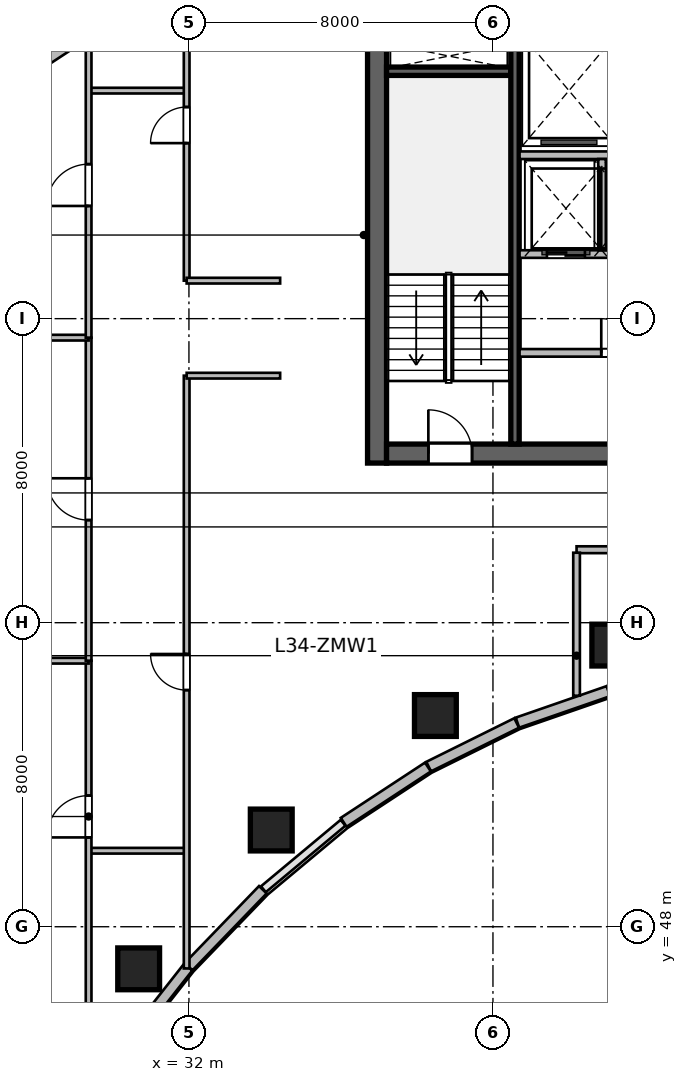
"""IFC4 building model, lengths in metres.
Left out: names, types, materials, properties, quantities, classifications, styles, units other than length and angle.
Written with IfcOpenShell. Run it as: python <this file> out.ifc"""

import sys

from ifc_helpers import new_model, si_unit, direction, frame, frame_2d, origin, origin_2d, place, context, subcontext, project, spatial, rectangle, circle, extrude, source, transform, mapped, element, fill, save


model = new_model("IFC4")
c1 = context("Model", 3, precision=1e-05, world=origin(), true_north=direction((0.0, 1.0)))
c2 = subcontext(c1, "Body", "Model", "MODEL_VIEW")
j1 = project(units=[si_unit("LENGTHUNIT", "METRE"), si_unit("PLANEANGLEUNIT", "RADIAN")], contexts=[c1])
p1 = place(None, origin())
s1 = spatial("IfcSite", under=j1, at=p1, CompositionType="ELEMENT")
p2 = place(p1, origin())
s2 = spatial("IfcBuilding", under=s1, at=p2, CompositionType="ELEMENT")
p3 = place(p2, frame((0.0, 0.0, 142.8)))
s3 = spatial("IfcBuildingStorey", under=s2, at=p3, CompositionType="ELEMENT", Elevation=142.8)
m1 = source(origin(), c2, "Body", "SweptSolid", [
    extrude(rectangle(XDim=12.0, YDim=0.5, at=frame_2d((6.0, 0.0))), origin(), (0.0, 0.0, 1.0), 3.9),
])
p4 = place(p3, frame((36.95, 60.2, 0.0), z_axis=(0.0, 0.0, 1.0), x_axis=(0.0, 1.0, 0.0)))
e1 = element("IfcWall", 1, at=p4, inside=s3, PredefinedType="SHEAR", context=c2, shape_type="MappedRepresentation", body=[
    mapped(m1, transform((0.0, 0.0, 0.0), scale=1.0)),
])
m2 = source(origin(), c2, "Body", "SweptSolid", [
    extrude(rectangle(XDim=21.6, YDim=0.5, at=frame_2d((10.8, 0.0))), origin(), (0.0, 0.0, 1.0), 3.9),
])
p5 = place(p3, frame((37.2, 60.45, 0.0), z_axis=(0.0, 0.0, 1.0), x_axis=(1.0, 0.0, 0.0)))
e2 = element("IfcWall", 2, at=p5, inside=s3, PredefinedType="SHEAR", context=c2, shape_type="MappedRepresentation", body=[
    mapped(m2, transform((0.0, 0.0, 0.0), scale=1.0)),
])
p6 = place(p5, frame((1.1, 0.0, 0.0)))
e3 = element("IfcOpeningElement", 3, at=p6, cuts=e2, PredefinedType="OPENING", context=c2, shape_type="SweptSolid", body=[
    extrude(rectangle(XDim=1.15, YDim=2.15, at=frame_2d((0.575, 1.075))), frame((0.0, 0.26, 0.0), z_axis=(0.0, -1.0, 0.0), x_axis=(1.0, 0.0, 0.0)), (0.0, 0.0, 1.0), 0.52),
])
p7 = place(p5, frame((19.5, 0.0, 0.0)))
e4 = element("IfcOpeningElement", 4, at=p7, cuts=e2, PredefinedType="OPENING", context=c2, shape_type="SweptSolid", body=[
    extrude(rectangle(XDim=0.9, YDim=2.1, at=frame_2d((0.45, 1.05))), frame((0.0, 0.26, 0.0), z_axis=(0.0, -1.0, 0.0), x_axis=(1.0, 0.0, 0.0)), (0.0, 0.0, 1.0), 0.52),
])
p8 = place(p5, frame((12.02, 0.0, 0.0)))
e5 = element("IfcOpeningElement", 5, at=p8, cuts=e2, PredefinedType="OPENING", context=c2, shape_type="SweptSolid", body=[
    extrude(rectangle(XDim=1.6, YDim=2.15, at=frame_2d((0.8, 1.075))), frame((0.0, 0.26, 0.0), z_axis=(0.0, -1.0, 0.0), x_axis=(1.0, 0.0, 0.0)), (0.0, 0.0, 1.0), 0.52),
])
m3 = source(origin(), c2, "Body", "SweptSolid", [
    extrude(rectangle(XDim=3.27, YDim=0.22, at=frame_2d((1.635, 0.0))), origin(), (0.0, 0.0, 1.0), 3.9),
])
p9 = place(p3, frame((37.2, 70.51, 0.0), z_axis=(0.0, 0.0, 1.0), x_axis=(1.0, 0.0, 0.0)))
e6 = element("IfcWall", 6, at=p9, inside=s3, PredefinedType="SHEAR", context=c2, shape_type="MappedRepresentation", body=[
    mapped(m3, transform((0.0, 0.0, 0.0), scale=1.0)),
])
m4 = source(origin(), c2, "Body", "SweptSolid", [
    extrude(rectangle(XDim=11.0, YDim=0.22, at=frame_2d((5.5, 0.0))), origin(), (0.0, 0.0, 1.0), 3.9),
])
p10 = place(p3, frame((40.58, 60.7, 0.0), z_axis=(0.0, 0.0, 1.0), x_axis=(0.0, 1.0, 0.0)))
e7 = element("IfcWall", 7, at=p10, inside=s3, PredefinedType="SHEAR", context=c2, shape_type="MappedRepresentation", body=[
    mapped(m4, transform((0.0, 0.0, 0.0), scale=1.0)),
])
m5 = source(origin(), c2, "Body", "SweptSolid", [
    extrude(circle(Radius=0.55, at=origin_2d()), origin(), (0.0, 0.0, 1.0), 3.9),
])
for number, where, z_axis, x_axis in (
    (8, (30.677, 46.892, 0.0), (0.0, 0.0, 1.0), (-0.571, 0.821, 0.0)),
    (9, (34.166, 50.545, 0.0), (0.0, 0.0, 1.0), (-0.436, 0.9, 0.0)),
    (10, (38.485, 53.558, 0.0), (0.0, 0.0, 1.0), (-0.289, 0.957, 0.0)),
    (11, (43.154, 55.411, 0.0), (0.0, 0.0, 1.0), (-0.143, 0.99, 0.0)),
):
    element("IfcColumn", number, at=place(p3, frame(where, z_axis=z_axis, x_axis=x_axis)), inside=s3, PredefinedType="COLUMN", context=c2, shape_type="MappedRepresentation", body=[
        mapped(m5, transform((0.0, 0.0, 0.0), scale=1.0)),
    ])
m6 = source(origin(), c2, "Body", "SweptSolid", [
    extrude(rectangle(XDim=2.53, YDim=0.28, at=frame_2d((1.265, 0.0))), origin(), (0.0, 0.0, 1.0), 3.65),
])
p11 = place(p3, frame((43.035, 54.198, 0.0), z_axis=(0.0, 0.0, 1.0), x_axis=(-0.944872429646, -0.327438683872, 0.0)))
e12 = element("IfcWall", 12, at=p11, inside=s3, PredefinedType="SOLIDWALL", context=c2, shape_type="MappedRepresentation", body=[
    mapped(m6, transform((0.0, 0.0, 0.0), scale=1.0)),
])
m7 = source(origin(), c2, "Body", "SweptSolid", [
    extrude(rectangle(XDim=2.584, YDim=0.28, at=frame_2d((1.292, 0.0))), origin(), (0.0, 0.0, 1.0), 3.65),
])
p12 = place(p3, frame((40.624, 53.361, 0.0), z_axis=(0.0, 0.0, 1.0), x_axis=(-0.895989792847, -0.44407464588, 0.0)))
e13 = element("IfcWall", 13, at=p12, inside=s3, PredefinedType="SOLIDWALL", context=c2, shape_type="MappedRepresentation", body=[
    mapped(m7, transform((0.0, 0.0, 0.0), scale=1.0)),
])
m8 = source(origin(), c2, "Body", "SweptSolid", [
    extrude(rectangle(XDim=2.652, YDim=0.28, at=frame_2d((1.326, 0.0))), origin(), (0.0, 0.0, 1.0), 3.65),
])
p13 = place(p3, frame((38.289, 52.202, 0.0), z_axis=(0.0, 0.0, 1.0), x_axis=(-0.836008323535, -0.54871676025, 0.0)))
e14 = element("IfcWall", 14, at=p13, inside=s3, PredefinedType="SOLIDWALL", context=c2, shape_type="MappedRepresentation", body=[
    mapped(m8, transform((0.0, 0.0, 0.0), scale=1.0)),
])
m9 = source(origin(), c2, "Body", "SweptSolid", [
    extrude(rectangle(XDim=2.812, YDim=0.28, at=frame_2d((1.406, 0.0))), origin(), (0.0, 0.0, 1.0), 3.65),
])
p14 = place(p3, frame((33.945, 48.973, 0.0), z_axis=(0.0, 0.0, 1.0), x_axis=(-0.694583668785, -0.719411931411, 0.0)))
e15 = element("IfcWall", 15, at=p14, inside=s3, PredefinedType="SOLIDWALL", context=c2, shape_type="MappedRepresentation", body=[
    mapped(m9, transform((0.0, 0.0, 0.0), scale=1.0)),
])
m10 = source(origin(), c2, "Body", "SweptSolid", [
    extrude(rectangle(XDim=2.897, YDim=0.28, at=frame_2d((1.448, 0.0))), origin(), (0.0, 0.0, 1.0), 3.65),
])
p15 = place(p3, frame((31.979, 46.936, 0.0), z_axis=(0.0, 0.0, 1.0), x_axis=(-0.618167636915, -0.786046291685, 0.0)))
e16 = element("IfcWall", 16, at=p15, inside=s3, PredefinedType="SOLIDWALL", context=c2, shape_type="MappedRepresentation", body=[
    mapped(m10, transform((0.0, 0.0, 0.0), scale=1.0)),
])
m11 = source(origin(), c2, "Body", "SweptSolid", [
    extrude(rectangle(XDim=4.501, YDim=0.28, at=frame_2d((2.25, 0.0))), origin(), (0.0, 0.0, 1.0), 3.65),
])
p16 = place(p3, frame((27.939, 70.61, 0.0), z_axis=(0.0, 0.0, 1.0), x_axis=(0.835984920737, 0.548752414391, 0.0)))
e17 = element("IfcWall", 17, at=p16, inside=s3, PredefinedType="SOLIDWALL", context=c2, shape_type="MappedRepresentation", body=[
    mapped(m11, transform((0.0, 0.0, 0.0), scale=1.0)),
])
m12 = source(origin(), c2, "Body", "SweptSolid", [
    extrude(rectangle(XDim=8.8, YDim=0.2, at=frame_2d((4.4, 0.0))), origin(), (0.0, 0.0, 1.0), 3.65),
])
p17 = place(p3, frame((40.7, 68.3, 0.0), z_axis=(0.0, 0.0, 1.0), x_axis=(1.0, 0.0, 0.0)))
e18 = element("IfcWall", 18, at=p17, inside=s3, PredefinedType="SOLIDWALL", context=c2, shape_type="MappedRepresentation", body=[
    mapped(m12, transform((0.0, 0.0, 0.0), scale=1.0)),
])
m13 = source(origin(), c2, "Body", "SweptSolid", [
    extrude(rectangle(XDim=8.02, YDim=0.2, at=frame_2d((4.01, 0.0))), origin(), (0.0, 0.0, 1.0), 3.65),
])
p18 = place(p3, frame((40.7, 63.1, 0.0), z_axis=(0.0, 0.0, 1.0), x_axis=(1.0, 0.0, 0.0)))
e19 = element("IfcWall", 19, at=p18, inside=s3, PredefinedType="SOLIDWALL", context=c2, shape_type="MappedRepresentation", body=[
    mapped(m13, transform((0.0, 0.0, 0.0), scale=1.0)),
])
p19 = place(p18, frame((2.15, 0.0, 0.0)))
e20 = element("IfcOpeningElement", 20, at=p19, cuts=e19, PredefinedType="OPENING", context=c2, shape_type="SweptSolid", body=[
    extrude(rectangle(XDim=0.9, YDim=2.1, at=frame_2d((0.45, 1.05))), frame((0.0, 0.11, 0.0), z_axis=(0.0, -1.0, 0.0), x_axis=(1.0, 0.0, 0.0)), (0.0, 0.0, 1.0), 0.22),
])
p20 = place(p18, frame((6.09, 0.0, 0.0)))
e21 = element("IfcOpeningElement", 21, at=p20, cuts=e19, PredefinedType="OPENING", context=c2, shape_type="SweptSolid", body=[
    extrude(rectangle(XDim=0.9, YDim=2.1, at=frame_2d((0.45, 1.05))), frame((0.0, 0.11, 0.0), z_axis=(0.0, -1.0, 0.0), x_axis=(1.0, 0.0, 0.0)), (0.0, 0.0, 1.0), 0.22),
])
p21 = place(p3, frame((40.7, 65.7, 0.0), z_axis=(0.0, 0.0, 1.0), x_axis=(1.0, 0.0, 0.0)))
e22 = element("IfcWall", 22, at=p21, inside=s3, PredefinedType="SOLIDWALL", context=c2, shape_type="MappedRepresentation", body=[
    mapped(m12, transform((0.0, 0.0, 0.0), scale=1.0)),
])
p22 = place(p21, frame((0.72, 0.0, 0.0)))
e23 = element("IfcOpeningElement", 23, at=p22, cuts=e22, PredefinedType="OPENING", context=c2, shape_type="SweptSolid", body=[
    extrude(rectangle(XDim=1.0, YDim=2.15, at=frame_2d((0.5, 1.075))), frame((0.0, 0.11, 0.0), z_axis=(0.0, -1.0, 0.0), x_axis=(1.0, 0.0, 0.0)), (0.0, 0.0, 1.0), 0.22),
])
p23 = place(p21, frame((2.62, 0.0, 0.0)))
e24 = element("IfcOpeningElement", 24, at=p23, cuts=e22, PredefinedType="OPENING", context=c2, shape_type="SweptSolid", body=[
    extrude(rectangle(XDim=1.0, YDim=2.15, at=frame_2d((0.5, 1.075))), frame((0.0, 0.11, 0.0), z_axis=(0.0, -1.0, 0.0), x_axis=(1.0, 0.0, 0.0)), (0.0, 0.0, 1.0), 0.22),
])
p24 = place(p21, frame((4.55, 0.0, 0.0)))
e25 = element("IfcOpeningElement", 25, at=p24, cuts=e22, PredefinedType="OPENING", context=c2, shape_type="SweptSolid", body=[
    extrude(rectangle(XDim=1.0, YDim=2.15, at=frame_2d((0.5, 1.075))), frame((0.0, 0.11, 0.0), z_axis=(0.0, -1.0, 0.0), x_axis=(1.0, 0.0, 0.0)), (0.0, 0.0, 1.0), 0.22),
])
p25 = place(p21, frame((6.55, 0.0, 0.0)))
e26 = element("IfcOpeningElement", 26, at=p25, cuts=e22, PredefinedType="OPENING", context=c2, shape_type="SweptSolid", body=[
    extrude(rectangle(XDim=1.0, YDim=2.15, at=frame_2d((0.5, 1.075))), frame((0.0, 0.11, 0.0), z_axis=(0.0, -1.0, 0.0), x_axis=(1.0, 0.0, 0.0)), (0.0, 0.0, 1.0), 0.22),
])
m14 = source(origin(), c2, "Body", "SweptSolid", [
    extrude(rectangle(XDim=2.4, YDim=0.2, at=frame_2d((1.2, 0.0))), origin(), (0.0, 0.0, 1.0), 3.65),
])
p26 = place(p3, frame((42.87, 65.8, 0.0), z_axis=(0.0, 0.0, 1.0), x_axis=(0.0, 1.0, 0.0)))
e27 = element("IfcWall", 27, at=p26, inside=s3, PredefinedType="SOLIDWALL", context=c2, shape_type="MappedRepresentation", body=[
    mapped(m14, transform((0.0, 0.0, 0.0), scale=1.0)),
])
m15 = source(origin(), c2, "Body", "SweptSolid", [
    extrude(rectangle(XDim=4.176, YDim=0.18, at=frame_2d((2.088, 0.0))), origin(), (0.0, 0.0, 1.0), 3.65),
])
p27 = place(p3, frame((42.2, 57.92, 0.0), z_axis=(0.0, 0.0, 1.0), x_axis=(1.0, 0.0, 0.0)))
e28 = element("IfcWall", 28, at=p27, inside=s3, PredefinedType="PLUMBINGWALL", context=c2, shape_type="MappedRepresentation", body=[
    mapped(m15, transform((0.0, 0.0, 0.0), scale=1.0)),
])
p28 = place(p27, frame((1.638, 0.0, 0.0)))
e29 = element("IfcOpeningElement", 29, at=p28, cuts=e28, PredefinedType="OPENING", context=c2, shape_type="SweptSolid", body=[
    extrude(rectangle(XDim=0.9, YDim=2.08, at=frame_2d((0.45, 1.04))), frame((0.0, 0.1, 0.0), z_axis=(0.0, -1.0, 0.0), x_axis=(1.0, 0.0, 0.0)), (0.0, 0.0, 1.0), 0.2),
])
m16 = source(origin(), c2, "Body", "SweptSolid", [
    extrude(rectangle(XDim=3.763, YDim=0.175, at=frame_2d((1.881, 0.0))), origin(), (0.0, 0.0, 1.0), 3.65),
])
p29 = place(p3, frame((42.2, 54.079, 0.0), z_axis=(0.0, 0.0, 1.0), x_axis=(0.0, 1.0, 0.0)))
e30 = element("IfcWall", 30, at=p29, inside=s3, PredefinedType="PARTITIONING", context=c2, shape_type="MappedRepresentation", body=[
    mapped(m16, transform((0.0, 0.0, 0.0), scale=1.0)),
])
m17 = source(origin(), c2, "Body", "SweptSolid", [
    extrude(rectangle(XDim=2.5, YDim=0.15, at=frame_2d((1.25, 0.0))), origin(), (0.0, 0.0, 1.0), 3.65),
])
for number, where, z_axis, x_axis in (
    (31, (29.4, 50.0, 0.0), (0.0, 0.0, 1.0), (1.0, 0.0, 0.0)),
    (32, (29.4, 70.0, 0.0), (0.0, 0.0, 1.0), (1.0, 0.0, 0.0)),
):
    element("IfcWall", number, at=place(p3, frame(where, z_axis=z_axis, x_axis=x_axis)), inside=s3, PredefinedType="PARTITIONING", context=c2, shape_type="MappedRepresentation", body=[
        mapped(m17, transform((0.0, 0.0, 0.0), scale=1.0)),
    ])
m18 = source(origin(), c2, "Body", "SweptSolid", [
    extrude(rectangle(XDim=11.612, YDim=0.15, at=frame_2d((5.806, 0.0))), origin(), (0.0, 0.0, 1.0), 2.942),
])
p30 = place(p3, frame((29.36, 43.388, 0.0), z_axis=(0.0, 0.0, 1.0), x_axis=(0.0, 1.0, 0.0)))
e33 = element("IfcWall", 33, at=p30, inside=s3, PredefinedType="PARTITIONING", context=c2, shape_type="MappedRepresentation", body=[
    mapped(m18, transform((0.0, 0.0, 0.0), scale=1.0)),
])
p31 = place(p30, frame((6.962, 0.0, 0.0)))
e34 = element("IfcOpeningElement", 34, at=p31, cuts=e33, PredefinedType="OPENING", context=c2, shape_type="SweptSolid", body=[
    extrude(rectangle(XDim=1.1, YDim=2.15, at=frame_2d((0.55, 1.075))), frame((0.0, 0.085, 0.0), z_axis=(0.0, -1.0, 0.0), x_axis=(1.0, 0.0, 0.0)), (0.0, 0.0, 1.0), 0.17),
])
m19 = source(origin(), c2, "Body", "SweptSolid", [
    extrude(rectangle(XDim=14.623, YDim=0.15, at=frame_2d((7.312, 0.0))), origin(), (0.0, 0.0, 1.0), 3.65),
])
p32 = place(p3, frame((14.737, 55.0, 0.0), z_axis=(0.0, 0.0, 1.0), x_axis=(1.0, 0.0, 0.0)))
e35 = element("IfcWall", 35, at=p32, inside=s3, PredefinedType="PARTITIONING", context=c2, shape_type="MappedRepresentation", body=[
    mapped(m19, transform((0.0, 0.0, 0.0), scale=1.0)),
])
m20 = source(origin(), c2, "Body", "SweptSolid", [
    extrude(rectangle(XDim=8.5, YDim=0.15, at=frame_2d((4.25, 0.0))), origin(), (0.0, 0.0, 1.0), 2.942),
])
p33 = place(p3, frame((29.36, 55.0, 0.0), z_axis=(0.0, 0.0, 1.0), x_axis=(0.0, 1.0, 0.0)))
e36 = element("IfcWall", 36, at=p33, inside=s3, PredefinedType="PARTITIONING", context=c2, shape_type="MappedRepresentation", body=[
    mapped(m20, transform((0.0, 0.0, 0.0), scale=1.0)),
])
p34 = place(p33, frame((3.7, 0.0, 0.0)))
e37 = element("IfcOpeningElement", 37, at=p34, cuts=e36, PredefinedType="OPENING", context=c2, shape_type="SweptSolid", body=[
    extrude(rectangle(XDim=1.1, YDim=2.15, at=frame_2d((0.55, 1.075))), frame((0.0, 0.085, 0.0), z_axis=(0.0, -1.0, 0.0), x_axis=(1.0, 0.0, 0.0)), (0.0, 0.0, 1.0), 0.17),
])
m21 = source(origin(), c2, "Body", "SweptSolid", [
    extrude(rectangle(XDim=8.839, YDim=0.15, at=frame_2d((4.419, 0.0))), origin(), (0.0, 0.0, 1.0), 3.65),
])
p35 = place(p3, frame((20.521, 63.5, 0.0), z_axis=(0.0, 0.0, 1.0), x_axis=(1.0, 0.0, 0.0)))
e38 = element("IfcWall", 38, at=p35, inside=s3, PredefinedType="PARTITIONING", context=c2, shape_type="MappedRepresentation", body=[
    mapped(m21, transform((0.0, 0.0, 0.0), scale=1.0)),
])
m22 = source(origin(), c2, "Body", "SweptSolid", [
    extrude(rectangle(XDim=8.031, YDim=0.15, at=frame_2d((4.015, 0.0))), origin(), (0.0, 0.0, 1.0), 3.65),
])
p36 = place(p3, frame((29.36, 63.5, 0.0), z_axis=(0.0, 0.0, 1.0), x_axis=(0.0, 1.0, 0.0)))
e39 = element("IfcWall", 39, at=p36, inside=s3, PredefinedType="PARTITIONING", context=c2, shape_type="MappedRepresentation", body=[
    mapped(m22, transform((0.0, 0.0, 0.0), scale=1.0)),
])
p37 = place(p36, frame((3.465, 0.0, 0.0)))
e40 = element("IfcOpeningElement", 40, at=p37, cuts=e39, PredefinedType="OPENING", context=c2, shape_type="SweptSolid", body=[
    extrude(rectangle(XDim=1.1, YDim=2.15, at=frame_2d((0.55, 1.075))), frame((0.0, 0.085, 0.0), z_axis=(0.0, -1.0, 0.0), x_axis=(1.0, 0.0, 0.0)), (0.0, 0.0, 1.0), 0.17),
])
m23 = source(origin(), c2, "Body", "SweptSolid", [
    extrude(rectangle(XDim=15.598, YDim=0.15, at=frame_2d((7.799, 0.0))), origin(), (0.0, 0.0, 1.0), 2.942),
])
p38 = place(p3, frame((31.94, 46.902, 0.0), z_axis=(0.0, 0.0, 1.0), x_axis=(0.0, 1.0, 0.0)))
e41 = element("IfcWall", 41, at=p38, inside=s3, PredefinedType="PARTITIONING", context=c2, shape_type="MappedRepresentation", body=[
    mapped(m23, transform((0.0, 0.0, 0.0), scale=1.0)),
])
p39 = place(p38, frame((7.324, 0.0, 0.0)))
e42 = element("IfcOpeningElement", 42, at=p39, cuts=e41, PredefinedType="OPENING", context=c2, shape_type="SweptSolid", body=[
    extrude(rectangle(XDim=0.95, YDim=2.1, at=frame_2d((0.475, 1.05))), frame((0.0, 0.085, 0.0), z_axis=(0.0, -1.0, 0.0), x_axis=(1.0, 0.0, 0.0)), (0.0, 0.0, 1.0), 0.17),
])
m24 = source(origin(), c2, "Body", "SweptSolid", [
    extrude(rectangle(XDim=2.46, YDim=0.15, at=frame_2d((1.23, 0.0))), origin(), (0.0, 0.0, 1.0), 3.65),
])
p40 = place(p3, frame((31.94, 62.5, 0.0), z_axis=(0.0, 0.0, 1.0), x_axis=(1.0, 0.0, 0.0)))
e43 = element("IfcWall", 43, at=p40, inside=s3, PredefinedType="PARTITIONING", context=c2, shape_type="MappedRepresentation", body=[
    mapped(m24, transform((0.0, 0.0, 0.0), scale=1.0)),
])
m25 = source(origin(), c2, "Body", "SweptSolid", [
    extrude(rectangle(XDim=8.187, YDim=0.15, at=frame_2d((4.093, 0.0))), origin(), (0.0, 0.0, 1.0), 3.65),
])
p41 = place(p3, frame((31.94, 65.0, 0.0), z_axis=(0.0, 0.0, 1.0), x_axis=(0.0, 1.0, 0.0)))
e44 = element("IfcWall", 44, at=p41, inside=s3, PredefinedType="PARTITIONING", context=c2, shape_type="MappedRepresentation", body=[
    mapped(m25, transform((0.0, 0.0, 0.0), scale=1.0)),
])
p42 = place(p41, frame((3.618, 0.0, 0.0)))
e45 = element("IfcOpeningElement", 45, at=p42, cuts=e44, PredefinedType="OPENING", context=c2, shape_type="SweptSolid", body=[
    extrude(rectangle(XDim=0.95, YDim=2.1, at=frame_2d((0.475, 1.05))), frame((0.0, 0.085, 0.0), z_axis=(0.0, -1.0, 0.0), x_axis=(1.0, 0.0, 0.0)), (0.0, 0.0, 1.0), 0.17),
])
p43 = place(p3, frame((31.94, 65.0, 0.0), z_axis=(0.0, 0.0, 1.0), x_axis=(1.0, 0.0, 0.0)))
e46 = element("IfcWall", 46, at=p43, inside=s3, PredefinedType="PARTITIONING", context=c2, shape_type="MappedRepresentation", body=[
    mapped(m24, transform((0.0, 0.0, 0.0), scale=1.0)),
])
m26 = source(origin(), c2, "Body", "SweptSolid", [
    extrude(rectangle(XDim=1.15, YDim=2.15, at=frame_2d((0.575, 1.075))), frame((0.0, 0.025, 0.0), z_axis=(0.0, -1.0, 0.0), x_axis=(1.0, 0.0, 0.0)), (0.0, 0.0, 1.0), 0.05),
])
p44 = place(p6, origin())
e47 = element("IfcDoor", 47, at=p44, inside=s3, OperationType="SINGLE_SWING_LEFT", PredefinedType="DOOR", context=c2, shape_type="MappedRepresentation", body=[
    mapped(m26, transform((0.0, 0.0, 0.0), scale=1.0)),
])
fill(e3, e47)
m27 = source(origin(), c2, "Body", "SweptSolid", [
    extrude(rectangle(XDim=0.9, YDim=2.1, at=frame_2d((0.45, 1.05))), frame((0.0, 0.025, 0.0), z_axis=(0.0, -1.0, 0.0), x_axis=(1.0, 0.0, 0.0)), (0.0, 0.0, 1.0), 0.05),
])
p45 = place(p19, origin())
e48 = element("IfcDoor", 48, at=p45, inside=s3, OperationType="SINGLE_SWING_LEFT", PredefinedType="DOOR", context=c2, shape_type="MappedRepresentation", body=[
    mapped(m27, transform((0.0, 0.0, 0.0), scale=1.0)),
])
fill(e20, e48)
m28 = source(origin(), c2, "Body", "SweptSolid", [
    extrude(rectangle(XDim=1.0, YDim=2.15, at=frame_2d((0.5, 1.075))), frame((0.0, 0.025, 0.0), z_axis=(0.0, -1.0, 0.0), x_axis=(1.0, 0.0, 0.0)), (0.0, 0.0, 1.0), 0.05),
])
p46 = place(p22, origin())
e49 = element("IfcDoor", 49, at=p46, inside=s3, OperationType="DOUBLE_DOOR_SLIDING", PredefinedType="DOOR", context=c2, shape_type="MappedRepresentation", body=[
    mapped(m28, transform((0.0, 0.0, 0.0), scale=1.0)),
])
fill(e23, e49)
m29 = source(origin(), c2, "Body", "SweptSolid", [
    extrude(rectangle(XDim=1.1, YDim=2.15, at=frame_2d((0.55, 1.075))), frame((0.0, 0.025, 0.0), z_axis=(0.0, -1.0, 0.0), x_axis=(1.0, 0.0, 0.0)), (0.0, 0.0, 1.0), 0.05),
])
p47 = place(p31, origin())
e50 = element("IfcDoor", 50, at=p47, inside=s3, OperationType="SINGLE_SWING_LEFT", PredefinedType="DOOR", context=c2, shape_type="MappedRepresentation", body=[
    mapped(m29, transform((0.0, 0.0, 0.0), scale=1.0)),
])
fill(e34, e50)
p48 = place(p34, origin())
e51 = element("IfcDoor", 51, at=p48, inside=s3, OperationType="SINGLE_SWING_RIGHT", PredefinedType="DOOR", context=c2, shape_type="MappedRepresentation", body=[
    mapped(m29, transform((0.0, 0.0, 0.0), scale=1.0)),
])
fill(e37, e51)
p49 = place(p37, origin())
e52 = element("IfcDoor", 52, at=p49, inside=s3, OperationType="SINGLE_SWING_LEFT", PredefinedType="DOOR", context=c2, shape_type="MappedRepresentation", body=[
    mapped(m29, transform((0.0, 0.0, 0.0), scale=1.0)),
])
fill(e40, e52)
m30 = source(origin(), c2, "Body", "SweptSolid", [
    extrude(rectangle(XDim=0.95, YDim=2.1, at=frame_2d((0.475, 1.05))), frame((0.0, 0.025, 0.0), z_axis=(0.0, -1.0, 0.0), x_axis=(1.0, 0.0, 0.0)), (0.0, 0.0, 1.0), 0.05),
])
p50 = place(p39, origin())
e53 = element("IfcDoor", 53, at=p50, inside=s3, OperationType="SINGLE_SWING_RIGHT", PredefinedType="DOOR", context=c2, shape_type="MappedRepresentation", body=[
    mapped(m30, transform((0.0, 0.0, 0.0), scale=1.0)),
])
fill(e42, e53)
p51 = place(p42, origin())
e54 = element("IfcDoor", 54, at=p51, inside=s3, OperationType="SINGLE_SWING_LEFT", PredefinedType="DOOR", context=c2, shape_type="MappedRepresentation", body=[
    mapped(m30, transform((0.0, 0.0, 0.0), scale=1.0)),
])
fill(e45, e54)
save(model, sys.argv[1])
